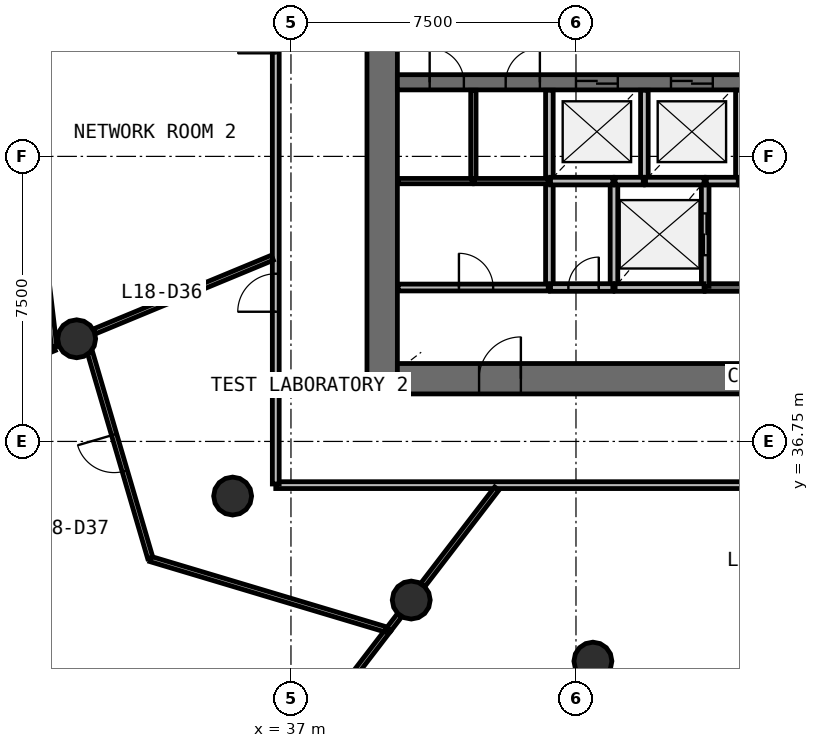
"""IFC4 building model, lengths in metres.
Left out: names, types, materials, properties, quantities, classifications, styles, units other than length and angle.
Written with IfcOpenShell. Run it as: python <this file> out.ifc"""

import sys

from ifc_helpers import new_model, si_unit, direction, frame, frame_2d, origin, origin_2d, place, context, subcontext, project, spatial, rectangle, circle, extrude, source, transform, mapped, element, fill, save


model = new_model("IFC4")
c1 = context("Model", 3, precision=1e-05, world=origin(), true_north=direction((0.0, 1.0)))
c2 = subcontext(c1, "Body", "Model", "MODEL_VIEW")
j1 = project(units=[si_unit("LENGTHUNIT", "METRE"), si_unit("PLANEANGLEUNIT", "RADIAN")], contexts=[c1])
p1 = place(None, origin())
s1 = spatial("IfcSite", under=j1, at=p1, CompositionType="ELEMENT")
p2 = place(p1, origin())
s2 = spatial("IfcBuilding", under=s1, at=p2, CompositionType="ELEMENT")
p3 = place(p2, frame((0.0, 0.0, 79.8)))
s3 = spatial("IfcBuildingStorey", under=s2, at=p3, CompositionType="ELEMENT", Elevation=79.8)
p4 = place(p3, frame((39.4, 58.0, 0.0), z_axis=(0.0, 0.0, 1.0), x_axis=(0.0, -1.0, 0.0)))
e1 = element("IfcWall", 1, at=p4, inside=s3, PredefinedType="SHEAR", context=c2, shape_type="SweptSolid", body=[
    extrude(rectangle(XDim=20.0, YDim=0.8, at=frame_2d((10.0, 0.0))), origin(), (0.0, 0.0, 1.0), 4.1),
])
p5 = place(p4, frame((9.1, 0.0, 0.0)))
e2 = element("IfcOpeningElement", 2, at=p5, cuts=e1, PredefinedType="OPENING", context=c2, shape_type="SweptSolid", body=[
    extrude(rectangle(XDim=1.8, YDim=2.1, at=frame_2d((0.9, 1.05))), frame((0.0, 0.41, 0.0), z_axis=(0.0, -1.0, 0.0), x_axis=(1.0, 0.0, 0.0)), (0.0, 0.0, 1.0), 0.82),
])
p6 = place(p3, frame((39.8, 38.4, 0.0), z_axis=(0.0, 0.0, 1.0), x_axis=(1.0, 0.0, 0.0)))
e3 = element("IfcWall", 3, at=p6, inside=s3, PredefinedType="SHEAR", context=c2, shape_type="SweptSolid", body=[
    extrude(rectangle(XDim=24.4, YDim=0.8, at=frame_2d((12.2, 0.0))), origin(), (0.0, 0.0, 1.0), 4.1),
])
p7 = place(p6, frame((21.65, 0.0, 0.0)))
e4 = element("IfcOpeningElement", 4, at=p7, cuts=e3, PredefinedType="OPENING", context=c2, shape_type="SweptSolid", body=[
    extrude(rectangle(XDim=1.1, YDim=2.1, at=frame_2d((0.55, 1.05))), frame((0.0, 0.41, 0.0), z_axis=(0.0, -1.0, 0.0), x_axis=(1.0, 0.0, 0.0)), (0.0, 0.0, 1.0), 0.82),
])
p8 = place(p6, frame((2.15, 0.0, 0.0)))
e5 = element("IfcOpeningElement", 5, at=p8, cuts=e3, PredefinedType="OPENING", context=c2, shape_type="SweptSolid", body=[
    extrude(rectangle(XDim=1.1, YDim=2.1, at=frame_2d((0.55, 1.05))), frame((0.0, 0.41, 0.0), z_axis=(0.0, -1.0, 0.0), x_axis=(1.0, 0.0, 0.0)), (0.0, 0.0, 1.0), 0.82),
])
p9 = place(p3, frame((39.8, 46.2, 0.0), z_axis=(0.0, 0.0, 1.0), x_axis=(1.0, 0.0, 0.0)))
e6 = element("IfcWall", 6, at=p9, inside=s3, PredefinedType="SHEAR", context=c2, shape_type="SweptSolid", body=[
    extrude(rectangle(XDim=24.4, YDim=0.4, at=frame_2d((12.2, 0.0))), origin(), (0.0, 0.0, 1.0), 4.1),
])
p10 = place(p9, frame((4.7, 0.0, 0.0)))
e7 = element("IfcOpeningElement", 7, at=p10, cuts=e6, PredefinedType="OPENING", context=c2, shape_type="SweptSolid", body=[
    extrude(rectangle(XDim=1.1, YDim=2.1, at=frame_2d((0.55, 1.05))), frame((0.0, 0.21, 0.0), z_axis=(0.0, -1.0, 0.0), x_axis=(1.0, 0.0, 0.0)), (0.0, 0.0, 1.0), 0.42),
])
p11 = place(p9, frame((7.2, 0.0, 0.0)))
e8 = element("IfcOpeningElement", 8, at=p11, cuts=e6, PredefinedType="OPENING", context=c2, shape_type="SweptSolid", body=[
    extrude(rectangle(XDim=1.1, YDim=2.1, at=frame_2d((0.55, 1.05))), frame((0.0, 0.21, 0.0), z_axis=(0.0, -1.0, 0.0), x_axis=(1.0, 0.0, 0.0)), (0.0, 0.0, 1.0), 0.42),
])
p12 = place(p9, frame((9.7, 0.0, 0.0)))
e9 = element("IfcOpeningElement", 9, at=p12, cuts=e6, PredefinedType="OPENING", context=c2, shape_type="SweptSolid", body=[
    extrude(rectangle(XDim=1.1, YDim=2.1, at=frame_2d((0.55, 1.05))), frame((0.0, 0.21, 0.0), z_axis=(0.0, -1.0, 0.0), x_axis=(1.0, 0.0, 0.0)), (0.0, 0.0, 1.0), 0.42),
])
p13 = place(p9, frame((20.65, 0.0, 0.0)))
e10 = element("IfcOpeningElement", 10, at=p13, cuts=e6, PredefinedType="OPENING", context=c2, shape_type="SweptSolid", body=[
    extrude(rectangle(XDim=0.9, YDim=2.1, at=frame_2d((0.45, 1.05))), frame((0.0, 0.21, 0.0), z_axis=(0.0, -1.0, 0.0), x_axis=(1.0, 0.0, 0.0)), (0.0, 0.0, 1.0), 0.42),
])
p14 = place(p9, frame((22.65, 0.0, 0.0)))
e11 = element("IfcOpeningElement", 11, at=p14, cuts=e6, PredefinedType="OPENING", context=c2, shape_type="SweptSolid", body=[
    extrude(rectangle(XDim=0.9, YDim=2.1, at=frame_2d((0.45, 1.05))), frame((0.0, 0.21, 0.0), z_axis=(0.0, -1.0, 0.0), x_axis=(1.0, 0.0, 0.0)), (0.0, 0.0, 1.0), 0.42),
])
p15 = place(p9, frame((0.85, 0.0, 0.0)))
e12 = element("IfcOpeningElement", 12, at=p15, cuts=e6, PredefinedType="OPENING", context=c2, shape_type="SweptSolid", body=[
    extrude(rectangle(XDim=0.9, YDim=2.1, at=frame_2d((0.45, 1.05))), frame((0.0, 0.21, 0.0), z_axis=(0.0, -1.0, 0.0), x_axis=(1.0, 0.0, 0.0)), (0.0, 0.0, 1.0), 0.42),
])
p16 = place(p9, frame((2.85, 0.0, 0.0)))
e13 = element("IfcOpeningElement", 13, at=p16, cuts=e6, PredefinedType="OPENING", context=c2, shape_type="SweptSolid", body=[
    extrude(rectangle(XDim=0.9, YDim=2.1, at=frame_2d((0.45, 1.05))), frame((0.0, 0.21, 0.0), z_axis=(0.0, -1.0, 0.0), x_axis=(1.0, 0.0, 0.0)), (0.0, 0.0, 1.0), 0.42),
])
p17 = place(p9, frame((11.85, 0.0, 0.0)))
e14 = element("IfcOpeningElement", 14, at=p17, cuts=e6, PredefinedType="OPENING", context=c2, shape_type="SweptSolid", body=[
    extrude(rectangle(XDim=0.9, YDim=2.1, at=frame_2d((0.45, 1.05))), frame((0.0, 0.21, 0.0), z_axis=(0.0, -1.0, 0.0), x_axis=(1.0, 0.0, 0.0)), (0.0, 0.0, 1.0), 0.42),
])
m1 = source(origin(), c2, "Body", "SweptSolid", [
    extrude(circle(Radius=0.5, at=origin_2d()), origin(), (0.0, 0.0, 1.0), 4.1),
])
for number, where, z_axis, x_axis in (
    (15, (31.361, 39.451, 0.0), (0.0, 0.0, 1.0), (1.0, 0.0, 0.0)),
    (16, (35.465, 35.312, 0.0), (0.0, 0.0, 1.0), (1.0, 0.0, 0.0)),
    (17, (40.165, 32.576, 0.0), (0.0, 0.0, 1.0), (1.0, 0.0, 0.0)),
    (18, (44.945, 30.969, 0.0), (0.0, 0.0, 1.0), (1.0, 0.0, 0.0)),
):
    element("IfcColumn", number, at=place(p3, frame(where, z_axis=z_axis, x_axis=x_axis)), inside=s3, PredefinedType="COLUMN", context=c2, shape_type="MappedRepresentation", body=[
        mapped(m1, transform((0.0, 0.0, 0.0), scale=1.0)),
    ])
p18 = place(p3, frame((47.9, 40.8, 0.0), z_axis=(0.0, 0.0, 1.0), x_axis=(1.0, 0.0, 0.0)))
e19 = element("IfcWall", 19, at=p18, inside=s3, PredefinedType="SOLIDWALL", context=c2, shape_type="SweptSolid", body=[
    extrude(rectangle(XDim=5.67, YDim=0.2, at=frame_2d((2.835, 0.0))), origin(), (0.0, 0.0, 1.0), 3.7),
])
p19 = place(p18, frame((2.95, 0.0, 0.0)))
e20 = element("IfcOpeningElement", 20, at=p19, cuts=e19, PredefinedType="OPENING", context=c2, shape_type="SweptSolid", body=[
    extrude(rectangle(XDim=1.1, YDim=2.1, at=frame_2d((0.55, 1.05))), frame((0.0, 0.11, 0.0), z_axis=(0.0, -1.0, 0.0), x_axis=(1.0, 0.0, 0.0)), (0.0, 0.0, 1.0), 0.22),
])
for number, where, z_axis, x_axis in (
    (21, (43.8, 43.6, 0.0), (0.0, 0.0, 1.0), (0.0, -1.0, 0.0)),
    (22, (45.5, 43.6, 0.0), (0.0, 0.0, 1.0), (0.0, -1.0, 0.0)),
):
    element("IfcWall", number, at=place(p3, frame(where, z_axis=z_axis, x_axis=x_axis)), inside=s3, PredefinedType="SOLIDWALL", context=c2, shape_type="SweptSolid", body=[
        extrude(rectangle(XDim=2.8, YDim=0.2, at=frame_2d((1.4, 0.0))), origin(), (0.0, 0.0, 1.0), 3.7),
    ])
p20 = place(p3, frame((47.9, 40.83, 0.0), z_axis=(0.0, 0.0, 1.0), x_axis=(0.0, 1.0, 0.0)))
e23 = element("IfcWall", 23, at=p20, inside=s3, PredefinedType="SOLIDWALL", context=c2, shape_type="SweptSolid", body=[
    extrude(rectangle(XDim=2.77, YDim=0.2, at=frame_2d((1.385, 0.0))), origin(), (0.0, 0.0, 1.0), 3.7),
])
p21 = place(p20, frame((0.82, 0.0, 0.0)))
e24 = element("IfcOpeningElement", 24, at=p21, cuts=e23, PredefinedType="OPENING", context=c2, shape_type="SweptSolid", body=[
    extrude(rectangle(XDim=1.1, YDim=2.1, at=frame_2d((0.55, 1.05))), frame((0.0, 0.11, 0.0), z_axis=(0.0, -1.0, 0.0), x_axis=(1.0, 0.0, 0.0)), (0.0, 0.0, 1.0), 0.22),
])
p22 = place(p3, frame((45.53, 40.8, 0.0), z_axis=(0.0, 0.0, 1.0), x_axis=(1.0, 0.0, 0.0)))
e25 = element("IfcWall", 25, at=p22, inside=s3, PredefinedType="SOLIDWALL", context=c2, shape_type="SweptSolid", body=[
    extrude(rectangle(XDim=2.34, YDim=0.2, at=frame_2d((1.17, 0.0))), origin(), (0.0, 0.0, 1.0), 3.7),
])
p23 = place(p3, frame((43.8, 45.99, 0.0), z_axis=(0.0, 0.0, 1.0), x_axis=(0.0, -1.0, 0.0)))
e26 = element("IfcWall", 26, at=p23, inside=s3, PredefinedType="SOLIDWALL", context=c2, shape_type="SweptSolid", body=[
    extrude(rectangle(XDim=2.36, YDim=0.2, at=frame_2d((1.18, 0.0))), origin(), (0.0, 0.0, 1.0), 3.7),
])
p24 = place(p3, frame((46.3, 43.6, 0.0), z_axis=(0.0, 0.0, 1.0), x_axis=(0.0, 1.0, 0.0)))
e27 = element("IfcWall", 27, at=p24, inside=s3, PredefinedType="SOLIDWALL", context=c2, shape_type="SweptSolid", body=[
    extrude(rectangle(XDim=2.39, YDim=0.2, at=frame_2d((1.195, 0.0))), origin(), (0.0, 0.0, 1.0), 3.7),
])
p25 = place(p3, frame((48.8, 43.63, 0.0), z_axis=(0.0, 0.0, 1.0), x_axis=(0.0, 1.0, 0.0)))
e28 = element("IfcWall", 28, at=p25, inside=s3, PredefinedType="SOLIDWALL", context=c2, shape_type="SweptSolid", body=[
    extrude(rectangle(XDim=2.36, YDim=0.2, at=frame_2d((1.18, 0.0))), origin(), (0.0, 0.0, 1.0), 3.7),
])
p26 = place(p3, frame((43.83, 43.6, 0.0), z_axis=(0.0, 0.0, 1.0), x_axis=(1.0, 0.0, 0.0)))
e29 = element("IfcWall", 29, at=p26, inside=s3, PredefinedType="SOLIDWALL", context=c2, shape_type="SweptSolid", body=[
    extrude(rectangle(XDim=1.64, YDim=0.2, at=frame_2d((0.82, 0.0))), origin(), (0.0, 0.0, 1.0), 3.7),
])
p27 = place(p3, frame((43.83, 40.8, 0.0), z_axis=(0.0, 0.0, 1.0), x_axis=(1.0, 0.0, 0.0)))
e30 = element("IfcWall", 30, at=p27, inside=s3, PredefinedType="SOLIDWALL", context=c2, shape_type="SweptSolid", body=[
    extrude(rectangle(XDim=1.64, YDim=0.2, at=frame_2d((0.82, 0.0))), origin(), (0.0, 0.0, 1.0), 3.7),
])
p28 = place(p27, frame((0.47, 0.0, 0.0)))
e31 = element("IfcOpeningElement", 31, at=p28, cuts=e30, PredefinedType="OPENING", context=c2, shape_type="SweptSolid", body=[
    extrude(rectangle(XDim=0.8, YDim=2.1, at=frame_2d((0.4, 1.05))), frame((0.0, 0.11, 0.0), z_axis=(0.0, -1.0, 0.0), x_axis=(1.0, 0.0, 0.0)), (0.0, 0.0, 1.0), 0.22),
])
p29 = place(p3, frame((46.33, 43.6, 0.0), z_axis=(0.0, 0.0, 1.0), x_axis=(1.0, 0.0, 0.0)))
e32 = element("IfcWall", 32, at=p29, inside=s3, PredefinedType="SOLIDWALL", context=c2, shape_type="SweptSolid", body=[
    extrude(rectangle(XDim=1.54, YDim=0.2, at=frame_2d((0.77, 0.0))), origin(), (0.0, 0.0, 1.0), 3.7),
])
p30 = place(p3, frame((47.93, 43.6, 0.0), z_axis=(0.0, 0.0, 1.0), x_axis=(1.0, 0.0, 0.0)))
e33 = element("IfcWall", 33, at=p30, inside=s3, PredefinedType="SOLIDWALL", context=c2, shape_type="SweptSolid", body=[
    extrude(rectangle(XDim=0.84, YDim=0.2, at=frame_2d((0.42, 0.0))), origin(), (0.0, 0.0, 1.0), 3.7),
])
p31 = place(p3, frame((45.53, 43.6, 0.0), z_axis=(0.0, 0.0, 1.0), x_axis=(1.0, 0.0, 0.0)))
e34 = element("IfcWall", 34, at=p31, inside=s3, PredefinedType="SOLIDWALL", context=c2, shape_type="SweptSolid", body=[
    extrude(rectangle(XDim=0.74, YDim=0.2, at=frame_2d((0.37, 0.0))), origin(), (0.0, 0.0, 1.0), 3.7),
])
p32 = place(p3, frame((67.4, 35.6, 0.0), z_axis=(0.0, 0.0, 1.0), x_axis=(-1.0, 0.0, 0.0)))
e35 = element("IfcWall", 35, at=p32, inside=s3, PredefinedType="PARTITIONING", context=c2, shape_type="SweptSolid", body=[
    extrude(rectangle(XDim=30.8, YDim=0.18, at=frame_2d((15.4, 0.0))), origin(), (0.0, 0.0, 1.0), 2.9),
])
p33 = place(p32, frame((17.35, 0.0, 0.0)))
e36 = element("IfcOpeningElement", 36, at=p33, cuts=e35, PredefinedType="OPENING", context=c2, shape_type="SweptSolid", body=[
    extrude(rectangle(XDim=1.0, YDim=2.1, at=frame_2d((0.5, 1.05))), frame((0.0, 0.1, 0.0), z_axis=(0.0, -1.0, 0.0), x_axis=(1.0, 0.0, 0.0)), (0.0, 0.0, 1.0), 0.2),
])
p34 = place(p32, frame((14.95, 0.0, 0.0)))
e37 = element("IfcOpeningElement", 37, at=p34, cuts=e35, PredefinedType="OPENING", context=c2, shape_type="SweptSolid", body=[
    extrude(rectangle(XDim=1.0, YDim=2.1, at=frame_2d((0.5, 1.05))), frame((0.0, 0.1, 0.0), z_axis=(0.0, -1.0, 0.0), x_axis=(1.0, 0.0, 0.0)), (0.0, 0.0, 1.0), 0.2),
])
p35 = place(p3, frame((36.6, 35.63, 0.0), z_axis=(0.0, 0.0, 1.0), x_axis=(0.0, 1.0, 0.0)))
e38 = element("IfcWall", 38, at=p35, inside=s3, PredefinedType="PARTITIONING", context=c2, shape_type="SweptSolid", body=[
    extrude(rectangle(XDim=23.583, YDim=0.18, at=frame_2d((11.791, 0.0))), origin(), (0.0, 0.0, 1.0), 2.9),
])
p36 = place(p35, frame((11.333, 0.0, 0.0)))
e39 = element("IfcOpeningElement", 39, at=p36, cuts=e38, PredefinedType="OPENING", context=c2, shape_type="SweptSolid", body=[
    extrude(rectangle(XDim=1.0, YDim=2.1, at=frame_2d((0.5, 1.05))), frame((0.0, 0.1, 0.0), z_axis=(0.0, -1.0, 0.0), x_axis=(1.0, 0.0, 0.0)), (0.0, 0.0, 1.0), 0.2),
])
p37 = place(p35, frame((4.532, 0.0, 0.0)))
e40 = element("IfcOpeningElement", 40, at=p37, cuts=e38, PredefinedType="OPENING", context=c2, shape_type="SweptSolid", body=[
    extrude(rectangle(XDim=1.0, YDim=2.1, at=frame_2d((0.5, 1.05))), frame((0.0, 0.1, 0.0), z_axis=(0.0, -1.0, 0.0), x_axis=(1.0, 0.0, 0.0)), (0.0, 0.0, 1.0), 0.2),
])
p38 = place(p3, frame((39.82, 40.8, 0.0), z_axis=(0.0, 0.0, 1.0), x_axis=(1.0, 0.0, 0.0)))
e41 = element("IfcWall", 41, at=p38, inside=s3, PredefinedType="PARTITIONING", context=c2, shape_type="SweptSolid", body=[
    extrude(rectangle(XDim=3.95, YDim=0.18, at=frame_2d((1.975, 0.0))), origin(), (0.0, 0.0, 1.0), 3.7),
])
p39 = place(p38, frame((1.6, 0.0, 0.0)))
e42 = element("IfcOpeningElement", 42, at=p39, cuts=e41, PredefinedType="OPENING", context=c2, shape_type="SweptSolid", body=[
    extrude(rectangle(XDim=0.9, YDim=2.1, at=frame_2d((0.45, 1.05))), frame((0.0, 0.1, 0.0), z_axis=(0.0, -1.0, 0.0), x_axis=(1.0, 0.0, 0.0)), (0.0, 0.0, 1.0), 0.2),
])
p40 = place(p3, frame((30.773, 39.208, 0.0), z_axis=(0.0, 0.0, 1.0), x_axis=(-0.923868434379, -0.382710224528, 0.0)))
e43 = element("IfcWall", 43, at=p40, inside=s3, PredefinedType="PARTITIONING", context=c2, shape_type="SweptSolid", body=[
    extrude(rectangle(XDim=7.219, YDim=0.14, at=frame_2d((3.609, 0.0))), origin(), (0.0, 0.0, 1.0), 2.9),
])
p41 = place(p3, frame((39.558, 31.785, 0.0), z_axis=(0.0, 0.0, 1.0), x_axis=(-0.608756067586, -0.793357454226, 0.0)))
e44 = element("IfcWall", 44, at=p41, inside=s3, PredefinedType="PARTITIONING", context=c2, shape_type="SweptSolid", body=[
    extrude(rectangle(XDim=7.122, YDim=0.14, at=frame_2d((3.561, 0.0))), origin(), (0.0, 0.0, 1.0), 2.9),
])
p42 = place(p3, frame((33.306, 33.656, 0.0), z_axis=(0.0, 0.0, 1.0), x_axis=(0.958019823731, -0.286701966054, 0.0)))
e45 = element("IfcWall", 45, at=p42, inside=s3, PredefinedType="PARTITIONING", context=c2, shape_type="SweptSolid", body=[
    extrude(rectangle(XDim=6.45, YDim=0.14, at=frame_2d((3.225, 0.0))), origin(), (0.0, 0.0, 1.0), 2.9),
])
p43 = place(p3, frame((30.769, 39.237, 0.0), z_axis=(0.0, 0.0, 1.0), x_axis=(-0.116719162139, 0.993164959707, 0.0)))
e46 = element("IfcWall", 46, at=p43, inside=s3, PredefinedType="PARTITIONING", context=c2, shape_type="SweptSolid", body=[
    extrude(rectangle(XDim=5.917, YDim=0.14, at=frame_2d((2.959, 0.0))), origin(), (0.0, 0.0, 1.0), 2.9),
])
p44 = place(p43, frame((2.467, 0.0, 0.0)))
e47 = element("IfcOpeningElement", 47, at=p44, cuts=e46, PredefinedType="OPENING", context=c2, shape_type="SweptSolid", body=[
    extrude(rectangle(XDim=1.0, YDim=2.1, at=frame_2d((0.5, 1.05))), frame((0.0, 0.08, 0.0), z_axis=(0.0, -1.0, 0.0), x_axis=(1.0, 0.0, 0.0)), (0.0, 0.0, 1.0), 0.16),
])
p45 = place(p3, frame((30.725, 50.801, 0.0), z_axis=(0.0, 0.0, 1.0), x_axis=(-0.112859657813, -0.993610938767, 0.0)))
e48 = element("IfcWall", 48, at=p45, inside=s3, PredefinedType="PARTITIONING", context=c2, shape_type="SweptSolid", body=[
    extrude(rectangle(XDim=5.694, YDim=0.14, at=frame_2d((2.847, 0.0))), origin(), (0.0, 0.0, 1.0), 2.9),
])
p46 = place(p3, frame((33.297, 33.684, 0.0), z_axis=(0.0, 0.0, 1.0), x_axis=(-0.281401194001, 0.959590208378, 0.0)))
e49 = element("IfcWall", 49, at=p46, inside=s3, PredefinedType="PARTITIONING", context=c2, shape_type="SweptSolid", body=[
    extrude(rectangle(XDim=5.632, YDim=0.14, at=frame_2d((2.816, 0.0))), origin(), (0.0, 0.0, 1.0), 2.9),
])
p47 = place(p46, frame((2.382, 0.0, 0.0)))
e50 = element("IfcOpeningElement", 50, at=p47, cuts=e49, PredefinedType="OPENING", context=c2, shape_type="SweptSolid", body=[
    extrude(rectangle(XDim=1.0, YDim=2.1, at=frame_2d((0.5, 1.05))), frame((0.0, 0.08, 0.0), z_axis=(0.0, -1.0, 0.0), x_axis=(1.0, 0.0, 0.0)), (0.0, 0.0, 1.0), 0.16),
])
p48 = place(p3, frame((36.51, 41.584, 0.0), z_axis=(0.0, 0.0, 1.0), x_axis=(-0.923890025086, -0.382658100067, 0.0)))
e51 = element("IfcWall", 51, at=p48, inside=s3, PredefinedType="PARTITIONING", context=c2, shape_type="SweptSolid", body=[
    extrude(rectangle(XDim=5.068, YDim=0.14, at=frame_2d((2.534, 0.0))), origin(), (0.0, 0.0, 1.0), 2.9),
])
p49 = place(p3, frame((42.416, 35.51, 0.0), z_axis=(0.0, 0.0, 1.0), x_axis=(-0.60874605662, -0.793365135703, 0.0)))
e52 = element("IfcWall", 52, at=p49, inside=s3, PredefinedType="PARTITIONING", context=c2, shape_type="SweptSolid", body=[
    extrude(rectangle(XDim=3.194, YDim=0.14, at=frame_2d((1.597, 0.0))), origin(), (0.0, 0.0, 1.0), 2.9),
])
p50 = place(p3, frame((41.8, 43.6, 0.0), z_axis=(0.0, 0.0, 1.0), x_axis=(0.0, 1.0, 0.0)))
e53 = element("IfcWall", 53, at=p50, inside=s3, PredefinedType="PARTITIONING", context=c2, shape_type="SweptSolid", body=[
    extrude(rectangle(XDim=2.39, YDim=0.14, at=frame_2d((1.195, 0.0))), origin(), (0.0, 0.0, 1.0), 2.9),
])
p51 = place(p3, frame((43.77, 43.6, 0.0), z_axis=(0.0, 0.0, 1.0), x_axis=(-1.0, 0.0, 0.0)))
e54 = element("IfcWall", 54, at=p51, inside=s3, PredefinedType="PARTITIONING", context=c2, shape_type="SweptSolid", body=[
    extrude(rectangle(XDim=1.94, YDim=0.14, at=frame_2d((0.97, 0.0))), origin(), (0.0, 0.0, 1.0), 2.9),
])
p52 = place(p3, frame((41.77, 43.6, 0.0), z_axis=(0.0, 0.0, 1.0), x_axis=(-1.0, 0.0, 0.0)))
e55 = element("IfcWall", 55, at=p52, inside=s3, PredefinedType="PARTITIONING", context=c2, shape_type="SweptSolid", body=[
    extrude(rectangle(XDim=1.95, YDim=0.14, at=frame_2d((0.975, 0.0))), origin(), (0.0, 0.0, 1.0), 2.9),
])
p53 = place(p3, frame((39.858, 32.176, 0.0), z_axis=(0.0, 0.0, 1.0), x_axis=(-0.608895872942, -0.793250159732, 0.0)))
e56 = element("IfcWall", 56, at=p53, inside=s3, PredefinedType="PARTITIONING", context=c2, shape_type="SweptSolid", body=[
    extrude(rectangle(XDim=0.464, YDim=0.14, at=frame_2d((0.232, 0.0))), origin(), (0.0, 0.0, 1.0), 2.9),
])
m2 = source(origin(), c2, "Body", "SweptSolid", [
    extrude(rectangle(XDim=1.1, YDim=2.1, at=frame_2d((0.55, 1.05))), frame((0.0, 0.025, 0.0), z_axis=(0.0, -1.0, 0.0), x_axis=(1.0, 0.0, 0.0)), (0.0, 0.0, 1.0), 0.05),
])
p54 = place(p10, origin())
e57 = element("IfcDoor", 57, at=p54, inside=s3, OperationType="DOUBLE_DOOR_SLIDING", PredefinedType="USERDEFINED", context=c2, shape_type="MappedRepresentation", body=[
    mapped(m2, transform((0.0, 0.0, 0.0), scale=1.0)),
])
fill(e7, e57)
p55 = place(p11, origin())
e58 = element("IfcDoor", 58, at=p55, inside=s3, OperationType="DOUBLE_DOOR_SLIDING", PredefinedType="USERDEFINED", context=c2, shape_type="MappedRepresentation", body=[
    mapped(m2, transform((0.0, 0.0, 0.0), scale=1.0)),
])
fill(e8, e58)
p56 = place(p21, origin())
e59 = element("IfcDoor", 59, at=p56, inside=s3, OperationType="DOUBLE_DOOR_SLIDING", PredefinedType="USERDEFINED", context=c2, shape_type="MappedRepresentation", body=[
    mapped(m2, transform((0.0, 0.0, 0.0), scale=1.0)),
])
fill(e24, e59)
m3 = source(origin(), c2, "Body", "SweptSolid", [
    extrude(rectangle(XDim=0.8, YDim=2.1, at=frame_2d((0.4, 1.05))), frame((0.0, 0.025, 0.0), z_axis=(0.0, -1.0, 0.0), x_axis=(1.0, 0.0, 0.0)), (0.0, 0.0, 1.0), 0.05),
])
p57 = place(p28, origin())
e60 = element("IfcDoor", 60, at=p57, inside=s3, OperationType="SINGLE_SWING_RIGHT", PredefinedType="DOOR", context=c2, shape_type="MappedRepresentation", body=[
    mapped(m3, transform((0.0, 0.0, 0.0), scale=1.0)),
])
fill(e31, e60)
m4 = source(origin(), c2, "Body", "SweptSolid", [
    extrude(rectangle(XDim=1.1, YDim=2.1, at=frame_2d((0.55, 1.05))), frame((0.0, 0.025, 0.0), z_axis=(0.0, -1.0, 0.0), x_axis=(1.0, 0.0, 0.0)), (0.0, 0.0, 1.0), 0.05),
])
p58 = place(p8, origin())
e61 = element("IfcDoor", 61, at=p58, inside=s3, OperationType="SINGLE_SWING_RIGHT", PredefinedType="DOOR", context=c2, shape_type="MappedRepresentation", body=[
    mapped(m4, transform((0.0, 0.0, 0.0), scale=1.0)),
])
fill(e5, e61)
m5 = source(origin(), c2, "Body", "SweptSolid", [
    extrude(rectangle(XDim=1.0, YDim=2.1, at=frame_2d((0.5, 1.05))), frame((0.0, 0.025, 0.0), z_axis=(0.0, -1.0, 0.0), x_axis=(1.0, 0.0, 0.0)), (0.0, 0.0, 1.0), 0.05),
])
p59 = place(p36, origin())
e62 = element("IfcDoor", 62, at=p59, inside=s3, OperationType="SINGLE_SWING_LEFT", PredefinedType="DOOR", context=c2, shape_type="MappedRepresentation", body=[
    mapped(m5, transform((0.0, 0.0, 0.0), scale=1.0)),
])
fill(e39, e62)
p60 = place(p37, origin())
e63 = element("IfcDoor", 63, at=p60, inside=s3, OperationType="SINGLE_SWING_LEFT", PredefinedType="DOOR", context=c2, shape_type="MappedRepresentation", body=[
    mapped(m5, transform((0.0, 0.0, 0.0), scale=1.0)),
])
fill(e40, e63)
p61 = place(p47, origin())
e64 = element("IfcDoor", 64, at=p61, inside=s3, OperationType="SINGLE_SWING_RIGHT", PredefinedType="DOOR", context=c2, shape_type="MappedRepresentation", body=[
    mapped(m5, transform((0.0, 0.0, 0.0), scale=1.0)),
])
fill(e50, e64)
m6 = source(origin(), c2, "Body", "SweptSolid", [
    extrude(rectangle(XDim=0.9, YDim=2.1, at=frame_2d((0.45, 1.05))), frame((0.0, 0.025, 0.0), z_axis=(0.0, -1.0, 0.0), x_axis=(1.0, 0.0, 0.0)), (0.0, 0.0, 1.0), 0.05),
])
p62 = place(p39, origin())
e65 = element("IfcDoor", 65, at=p62, inside=s3, OperationType="SINGLE_SWING_LEFT", PredefinedType="DOOR", context=c2, shape_type="MappedRepresentation", body=[
    mapped(m6, transform((0.0, 0.0, 0.0), scale=1.0)),
])
fill(e42, e65)
p63 = place(p15, origin())
e66 = element("IfcDoor", 66, at=p63, inside=s3, OperationType="SINGLE_SWING_LEFT", PredefinedType="DOOR", context=c2, shape_type="MappedRepresentation", body=[
    mapped(m6, transform((0.0, 0.0, 0.0), scale=1.0)),
])
fill(e12, e66)
p64 = place(p16, origin())
e67 = element("IfcDoor", 67, at=p64, inside=s3, OperationType="SINGLE_SWING_RIGHT", PredefinedType="DOOR", context=c2, shape_type="MappedRepresentation", body=[
    mapped(m6, transform((0.0, 0.0, 0.0), scale=1.0)),
])
fill(e13, e67)
save(model, sys.argv[1])
